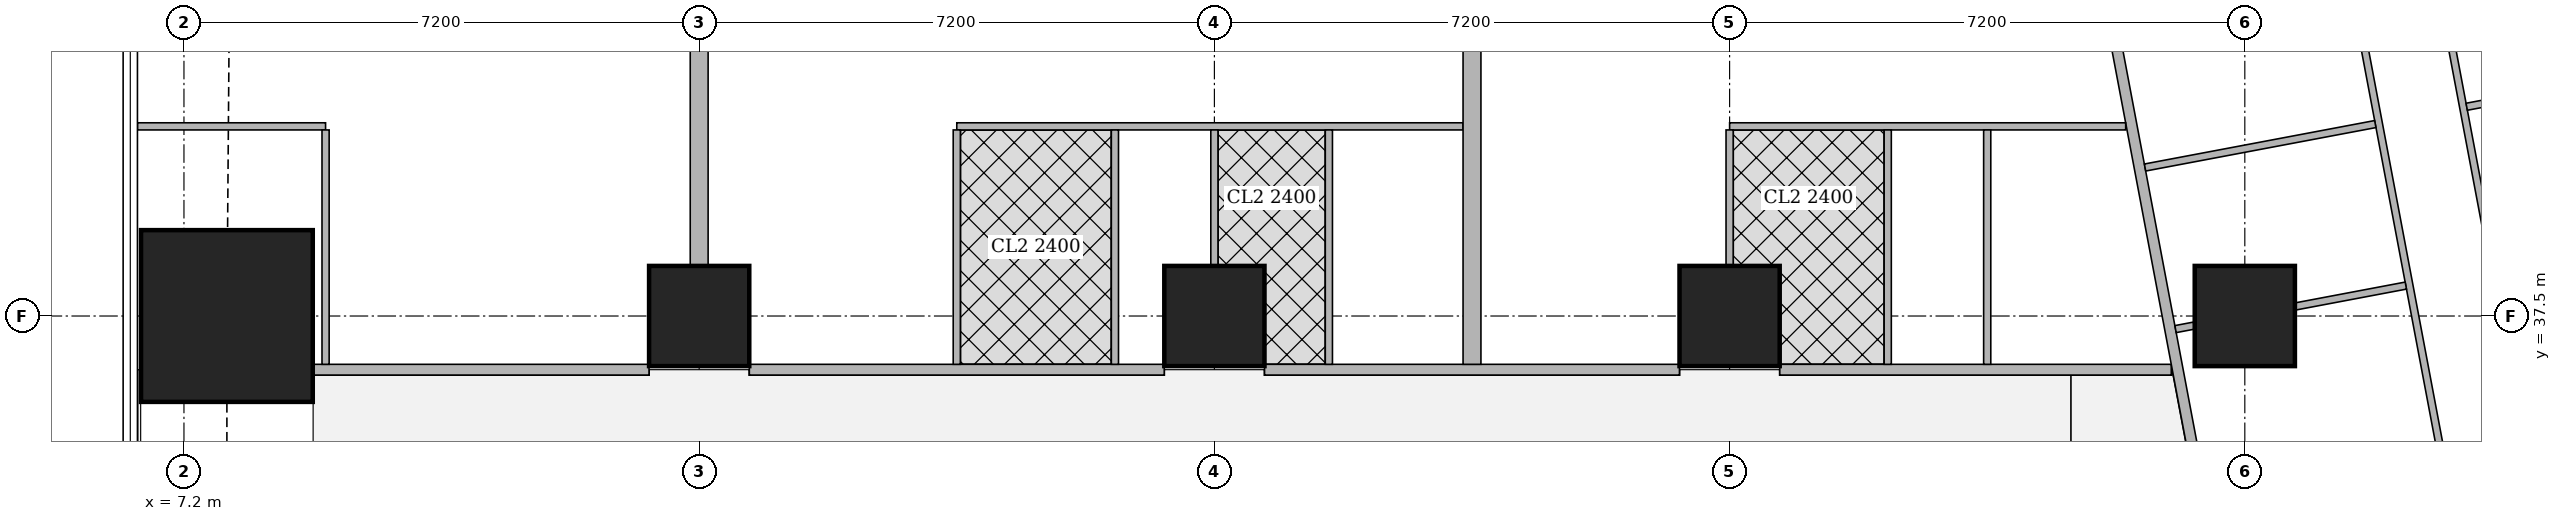
"""IFC4 building model, lengths in metres.
Left out: names, types, materials, properties, quantities, classifications, styles, units other than length and angle.
Written with IfcOpenShell. Run it as: python <this file> out.ifc"""

import sys

from ifc_helpers import new_model, si_unit, direction, frame, frame_2d, origin, origin_2d, place, context, subcontext, project, spatial, rectangle, extrude, element, fill, save


model = new_model("IFC4")
c1 = context("Model", 3, precision=1e-05, world=origin(), true_north=direction((0.0, 1.0)))
c2 = subcontext(c1, "Body", "Model", "MODEL_VIEW")
j1 = project(units=[si_unit("LENGTHUNIT", "METRE"), si_unit("PLANEANGLEUNIT", "RADIAN")], contexts=[c1])
p1 = place(None, origin())
s1 = spatial("IfcSite", under=j1, at=p1, CompositionType="ELEMENT")
p2 = place(p1, origin())
s2 = spatial("IfcBuilding", under=s1, at=p2, CompositionType="ELEMENT")
p3 = place(p2, frame((0.0, 0.0, 216.2)))
s3 = spatial("IfcBuildingStorey", under=s2, at=p3, CompositionType="ELEMENT", Elevation=216.2)
p4 = place(p3, frame((7.8, 37.5, 0.0), z_axis=(0.0, 0.0, 1.0), x_axis=(1.0, 0.0, 0.0)))
e1 = element("IfcColumn", 1, at=p4, inside=s3, PredefinedType="COLUMN", context=c2, shape_type="SweptSolid", body=[
    extrude(rectangle(XDim=2.4, YDim=2.4, at=origin_2d()), origin(), (0.0, 0.0, 1.0), 3.75),
])
for number, where, z_axis, x_axis in (
    (2, (14.4, 37.5, 0.0), (0.0, 0.0, 1.0), (1.0, 0.0, 0.0)),
    (3, (21.6, 37.5, 0.0), (0.0, 0.0, 1.0), (1.0, 0.0, 0.0)),
    (4, (28.8, 37.5, 0.0), (0.0, 0.0, 1.0), (1.0, 0.0, 0.0)),
    (5, (36.0, 37.5, 0.0), (0.0, 0.0, 1.0), (1.0, 0.0, 0.0)),
):
    element("IfcColumn", number, at=place(p3, frame(where, z_axis=z_axis, x_axis=x_axis)), inside=s3, PredefinedType="COLUMN", context=c2, shape_type="SweptSolid", body=[
        extrude(rectangle(XDim=1.4, YDim=1.4, at=origin_2d()), origin(), (0.0, 0.0, 1.0), 3.75),
    ])
p5 = place(p3, frame((9.001, 36.75, 0.0), z_axis=(0.0, 0.0, 1.0), x_axis=(1.0, 0.0, 0.0)))
e6 = element("IfcWall", 6, at=p5, inside=s3, PredefinedType="SOLIDWALL", context=c2, shape_type="SweptSolid", body=[
    extrude(rectangle(XDim=4.698, YDim=0.15, at=frame_2d((2.349, 0.0))), origin(), (0.0, 0.0, 1.0), 3.5),
])
p6 = place(p5, frame((0.353, 0.0, 0.0)))
e7 = element("IfcOpeningElement", 7, at=p6, cuts=e6, PredefinedType="OPENING", context=c2, shape_type="SweptSolid", body=[
    extrude(rectangle(XDim=1.0, YDim=2.1, at=frame_2d((0.5, 1.05))), frame((0.0, 0.085, 0.0), z_axis=(0.0, -1.0, 0.0), x_axis=(1.0, 0.0, 0.0)), (0.0, 0.0, 1.0), 0.17),
])
p7 = place(p3, frame((15.101, 36.75, 0.0), z_axis=(0.0, 0.0, 1.0), x_axis=(1.0, 0.0, 0.0)))
e8 = element("IfcWall", 8, at=p7, inside=s3, PredefinedType="SOLIDWALL", context=c2, shape_type="SweptSolid", body=[
    extrude(rectangle(XDim=5.798, YDim=0.15, at=frame_2d((2.899, 0.0))), origin(), (0.0, 0.0, 1.0), 3.5),
])
p8 = place(p7, frame((0.799, 0.0, 0.0)))
e9 = element("IfcOpeningElement", 9, at=p8, cuts=e8, PredefinedType="OPENING", context=c2, shape_type="SweptSolid", body=[
    extrude(rectangle(XDim=1.0, YDim=2.1, at=frame_2d((0.5, 1.05))), frame((0.0, 0.085, 0.0), z_axis=(0.0, -1.0, 0.0), x_axis=(1.0, 0.0, 0.0)), (0.0, 0.0, 1.0), 0.17),
])
p9 = place(p3, frame((22.301, 36.75, 0.0), z_axis=(0.0, 0.0, 1.0), x_axis=(1.0, 0.0, 0.0)))
e10 = element("IfcWall", 10, at=p9, inside=s3, PredefinedType="SOLIDWALL", context=c2, shape_type="SweptSolid", body=[
    extrude(rectangle(XDim=5.798, YDim=0.15, at=frame_2d((2.899, 0.0))), origin(), (0.0, 0.0, 1.0), 3.5),
])
p10 = place(p9, frame((4.082, 0.0, 0.0)))
e11 = element("IfcOpeningElement", 11, at=p10, cuts=e10, PredefinedType="OPENING", context=c2, shape_type="SweptSolid", body=[
    extrude(rectangle(XDim=1.0, YDim=2.1, at=frame_2d((0.5, 1.05))), frame((0.0, 0.085, 0.0), z_axis=(0.0, -1.0, 0.0), x_axis=(1.0, 0.0, 0.0)), (0.0, 0.0, 1.0), 0.17),
])
p11 = place(p3, frame((29.501, 36.75, 0.0), z_axis=(0.0, 0.0, 1.0), x_axis=(1.0, 0.0, 0.0)))
e12 = element("IfcWall", 12, at=p11, inside=s3, PredefinedType="SOLIDWALL", context=c2, shape_type="SweptSolid", body=[
    extrude(rectangle(XDim=5.471, YDim=0.15, at=frame_2d((2.735, 0.0))), origin(), (0.0, 0.0, 1.0), 3.5),
])
p12 = place(p3, frame((33.933, 42.73, 0.0), z_axis=(0.0, 0.0, 1.0), x_axis=(0.185595417643, -0.982626246825, 0.0)))
e13 = element("IfcWall", 13, at=p12, inside=s3, PredefinedType="SOLIDWALL", context=c2, shape_type="SweptSolid", body=[
    extrude(rectangle(XDim=41.051, YDim=0.15, at=frame_2d((20.525, 0.0))), origin(), (0.0, 0.0, 1.0), 2.5),
])
p13 = place(p12, frame((12.266, 0.0, 0.0)))
e14 = element("IfcOpeningElement", 14, at=p13, cuts=e13, PredefinedType="OPENING", context=c2, shape_type="SweptSolid", body=[
    extrude(rectangle(XDim=1.0, YDim=2.1, at=frame_2d((0.5, 1.05))), frame((0.0, 0.085, 0.0), z_axis=(0.0, -1.0, 0.0), x_axis=(1.0, 0.0, 0.0)), (0.0, 0.0, 1.0), 0.17),
])
p14 = place(p12, frame((16.082, 0.0, 0.0)))
e15 = element("IfcOpeningElement", 15, at=p14, cuts=e13, PredefinedType="OPENING", context=c2, shape_type="SweptSolid", body=[
    extrude(rectangle(XDim=1.0, YDim=2.1, at=frame_2d((0.5, 1.05))), frame((0.0, 0.085, 0.0), z_axis=(0.0, -1.0, 0.0), x_axis=(1.0, 0.0, 0.0)), (0.0, 0.0, 1.0), 0.17),
])
p15 = place(p12, frame((24.369, 0.0, 0.0)))
e16 = element("IfcOpeningElement", 16, at=p15, cuts=e13, PredefinedType="OPENING", context=c2, shape_type="SweptSolid", body=[
    extrude(rectangle(XDim=1.0, YDim=2.1, at=frame_2d((0.5, 1.05))), frame((0.0, 0.085, 0.0), z_axis=(0.0, -1.0, 0.0), x_axis=(1.0, 0.0, 0.0)), (0.0, 0.0, 1.0), 0.17),
])
p16 = place(p12, frame((30.862, 0.0, 0.0)))
e17 = element("IfcOpeningElement", 17, at=p16, cuts=e13, PredefinedType="OPENING", context=c2, shape_type="SweptSolid", body=[
    extrude(rectangle(XDim=1.0, YDim=2.1, at=frame_2d((0.5, 1.05))), frame((0.0, 0.085, 0.0), z_axis=(0.0, -1.0, 0.0), x_axis=(1.0, 0.0, 0.0)), (0.0, 0.0, 1.0), 0.17),
])
p17 = place(p3, frame((38.764, 41.941, 0.0), z_axis=(0.0, 0.0, 1.0), x_axis=(0.185548572312, -0.982635093671, 0.0)))
e18 = element("IfcWall", 18, at=p17, inside=s3, PredefinedType="PARTITIONING", context=c2, shape_type="SweptSolid", body=[
    extrude(rectangle(XDim=9.135, YDim=0.1, at=frame_2d((4.568, 0.0))), origin(), (0.0, 0.0, 1.0), 3.5),
])
p18 = place(p17, frame((8.085, 0.0, 0.0)))
e19 = element("IfcOpeningElement", 19, at=p18, cuts=e18, PredefinedType="OPENING", context=c2, shape_type="SweptSolid", body=[
    extrude(rectangle(XDim=0.9, YDim=2.1, at=frame_2d((0.45, 1.05))), frame((0.0, 0.06, 0.0), z_axis=(0.0, -1.0, 0.0), x_axis=(1.0, 0.0, 0.0)), (0.0, 0.0, 1.0), 0.12),
])
p19 = place(p17, frame((3.7, 0.0, 0.0)))
e20 = element("IfcOpeningElement", 20, at=p19, cuts=e18, PredefinedType="OPENING", context=c2, shape_type="SweptSolid", body=[
    extrude(rectangle(XDim=0.9, YDim=2.1, at=frame_2d((0.45, 1.05))), frame((0.0, 0.06, 0.0), z_axis=(0.0, -1.0, 0.0), x_axis=(1.0, 0.0, 0.0)), (0.0, 0.0, 1.0), 0.12),
])
p20 = place(p3, frame((37.473, 42.309, 0.0), z_axis=(0.0, 0.0, 1.0), x_axis=(0.185491912953, -0.982645790827, 0.0)))
e21 = element("IfcWall", 21, at=p20, inside=s3, PredefinedType="PARTITIONING", context=c2, shape_type="SweptSolid", body=[
    extrude(rectangle(XDim=9.737, YDim=0.1, at=frame_2d((4.869, 0.0))), origin(), (0.0, 0.0, 1.0), 3.5),
])
p21 = place(p20, frame((8.232, 0.0, 0.0)))
e22 = element("IfcOpeningElement", 22, at=p21, cuts=e21, PredefinedType="OPENING", context=c2, shape_type="SweptSolid", body=[
    extrude(rectangle(XDim=0.9, YDim=2.1, at=frame_2d((0.45, 1.05))), frame((0.0, 0.06, 0.0), z_axis=(0.0, -1.0, 0.0), x_axis=(1.0, 0.0, 0.0)), (0.0, 0.0, 1.0), 0.12),
])
p22 = place(p20, frame((2.853, 0.0, 0.0)))
e23 = element("IfcOpeningElement", 23, at=p22, cuts=e21, PredefinedType="OPENING", context=c2, shape_type="SweptSolid", body=[
    extrude(rectangle(XDim=0.9, YDim=2.1, at=frame_2d((0.45, 1.05))), frame((0.0, 0.06, 0.0), z_axis=(0.0, -1.0, 0.0), x_axis=(1.0, 0.0, 0.0)), (0.0, 0.0, 1.0), 0.12),
])
p23 = place(p20, frame((5.564, 0.0, 0.0)))
e24 = element("IfcOpeningElement", 24, at=p23, cuts=e21, PredefinedType="OPENING", context=c2, shape_type="SweptSolid", body=[
    extrude(rectangle(XDim=0.9, YDim=2.1, at=frame_2d((0.45, 1.05))), frame((0.0, 0.06, 0.0), z_axis=(0.0, -1.0, 0.0), x_axis=(1.0, 0.0, 0.0)), (0.0, 0.0, 1.0), 0.12),
])
p24 = place(p3, frame((43.277, 41.212, 0.0), z_axis=(0.0, 0.0, 1.0), x_axis=(-0.982665405803, -0.185387972203, 0.0)))
e25 = element("IfcWall", 25, at=p24, inside=s3, PredefinedType="PARTITIONING", context=c2, shape_type="SweptSolid", body=[
    extrude(rectangle(XDim=4.25, YDim=0.1, at=frame_2d((2.125, 0.0))), origin(), (0.0, 0.0, 1.0), 2.05),
])
p25 = place(p3, frame((37.823, 40.182, 0.0), z_axis=(0.0, 0.0, 1.0), x_axis=(-0.982664729897, -0.18539155487, 0.0)))
e26 = element("IfcWall", 26, at=p25, inside=s3, PredefinedType="PARTITIONING", context=c2, shape_type="SweptSolid", body=[
    extrude(rectangle(XDim=3.274, YDim=0.1, at=frame_2d((1.637, 0.0))), origin(), (0.0, 0.0, 1.0), 3.5),
])
p26 = place(p3, frame((38.25, 37.925, 0.0), z_axis=(0.0, 0.0, 1.0), x_axis=(-0.982610209589, -0.185680305934, 0.0)))
e27 = element("IfcWall", 27, at=p26, inside=s3, PredefinedType="PARTITIONING", context=c2, shape_type="SweptSolid", body=[
    extrude(rectangle(XDim=1.567, YDim=0.1, at=frame_2d((0.784, 0.0))), origin(), (0.0, 0.0, 1.0), 3.5),
])
p27 = place(p3, frame((35.29, 37.366, 0.0), z_axis=(0.0, 0.0, 1.0), x_axis=(-0.982395465615, -0.18681313963, 0.0)))
e28 = element("IfcWall", 28, at=p27, inside=s3, PredefinedType="PARTITIONING", context=c2, shape_type="SweptSolid", body=[
    extrude(rectangle(XDim=0.263, YDim=0.1, at=frame_2d((0.131, 0.0))), origin(), (0.0, 0.0, 1.0), 3.5),
])
p28 = place(p3, frame((6.55, 40.15, 0.0), z_axis=(0.0, 0.0, 1.0), x_axis=(1.0, 0.0, 0.0)))
e29 = element("IfcWall", 29, at=p28, inside=s3, PredefinedType="PARTITIONING", context=c2, shape_type="SweptSolid", body=[
    extrude(rectangle(XDim=2.629, YDim=0.1, at=frame_2d((1.314, 0.0))), origin(), (0.0, 0.0, 1.0), 2.05),
])
p29 = place(p3, frame((9.179, 36.825, 0.0), z_axis=(0.0, 0.0, 1.0), x_axis=(0.0, 1.0, 0.0)))
e30 = element("IfcWall", 30, at=p29, inside=s3, PredefinedType="PARTITIONING", context=c2, shape_type="SweptSolid", body=[
    extrude(rectangle(XDim=3.275, YDim=0.1, at=frame_2d((1.638, 0.0))), origin(), (0.0, 0.0, 1.0), 3.5),
])
p30 = place(p29, frame((2.225, 0.0, 0.0)))
e31 = element("IfcOpeningElement", 31, at=p30, cuts=e30, PredefinedType="OPENING", context=c2, shape_type="SweptSolid", body=[
    extrude(rectangle(XDim=0.9, YDim=2.1, at=frame_2d((0.45, 1.05))), frame((0.0, 0.06, 0.0), z_axis=(0.0, -1.0, 0.0), x_axis=(1.0, 0.0, 0.0)), (0.0, 0.0, 1.0), 0.12),
])
p31 = place(p3, frame((18.0, 40.15, 0.0), z_axis=(0.0, 0.0, 1.0), x_axis=(1.0, 0.0, 0.0)))
e32 = element("IfcWall", 32, at=p31, inside=s3, PredefinedType="PARTITIONING", context=c2, shape_type="SweptSolid", body=[
    extrude(rectangle(XDim=7.075, YDim=0.1, at=frame_2d((3.538, 0.0))), origin(), (0.0, 0.0, 1.0), 3.5),
])
p32 = place(p31, frame((0.655, 0.0, 0.0)))
e33 = element("IfcOpeningElement", 33, at=p32, cuts=e32, PredefinedType="OPENING", context=c2, shape_type="SweptSolid", body=[
    extrude(rectangle(XDim=0.9, YDim=2.1, at=frame_2d((0.45, 1.05))), frame((0.0, 0.06, 0.0), z_axis=(0.0, -1.0, 0.0), x_axis=(1.0, 0.0, 0.0)), (0.0, 0.0, 1.0), 0.12),
])
p33 = place(p31, frame((3.95, 0.0, 0.0)))
e34 = element("IfcOpeningElement", 34, at=p33, cuts=e32, PredefinedType="OPENING", context=c2, shape_type="SweptSolid", body=[
    extrude(rectangle(XDim=0.9, YDim=2.1, at=frame_2d((0.45, 1.05))), frame((0.0, 0.06, 0.0), z_axis=(0.0, -1.0, 0.0), x_axis=(1.0, 0.0, 0.0)), (0.0, 0.0, 1.0), 0.12),
])
p34 = place(p31, frame((2.455, 0.0, 0.0)))
e35 = element("IfcOpeningElement", 35, at=p34, cuts=e32, PredefinedType="OPENING", context=c2, shape_type="SweptSolid", body=[
    extrude(rectangle(XDim=0.9, YDim=2.1, at=frame_2d((0.45, 1.05))), frame((0.0, 0.06, 0.0), z_axis=(0.0, -1.0, 0.0), x_axis=(1.0, 0.0, 0.0)), (0.0, 0.0, 1.0), 0.12),
])
p35 = place(p31, frame((5.75, 0.0, 0.0)))
e36 = element("IfcOpeningElement", 36, at=p35, cuts=e32, PredefinedType="OPENING", context=c2, shape_type="SweptSolid", body=[
    extrude(rectangle(XDim=0.9, YDim=2.1, at=frame_2d((0.45, 1.05))), frame((0.0, 0.06, 0.0), z_axis=(0.0, -1.0, 0.0), x_axis=(1.0, 0.0, 0.0)), (0.0, 0.0, 1.0), 0.12),
])
p36 = place(p3, frame((18.0, 36.825, 0.0), z_axis=(0.0, 0.0, 1.0), x_axis=(0.0, 1.0, 0.0)))
e37 = element("IfcWall", 37, at=p36, inside=s3, PredefinedType="PARTITIONING", context=c2, shape_type="SweptSolid", body=[
    extrude(rectangle(XDim=3.275, YDim=0.1, at=frame_2d((1.638, 0.0))), origin(), (0.0, 0.0, 1.0), 3.5),
])
p37 = place(p3, frame((21.6, 38.201, 0.0), z_axis=(0.0, 0.0, 1.0), x_axis=(0.0, 1.0, 0.0)))
e38 = element("IfcWall", 38, at=p37, inside=s3, PredefinedType="PARTITIONING", context=c2, shape_type="SweptSolid", body=[
    extrude(rectangle(XDim=1.899, YDim=0.1, at=frame_2d((0.95, 0.0))), origin(), (0.0, 0.0, 1.0), 3.5),
])
for number, where, z_axis, x_axis in (
    (39, (20.21, 36.825, 0.0), (0.0, 0.0, 1.0), (0.0, 1.0, 0.0)),
    (40, (23.2, 36.825, 0.0), (0.0, 0.0, 1.0), (0.0, 1.0, 0.0)),
):
    element("IfcWall", number, at=place(p3, frame(where, z_axis=z_axis, x_axis=x_axis)), inside=s3, PredefinedType="PARTITIONING", context=c2, shape_type="SweptSolid", body=[
        extrude(rectangle(XDim=3.275, YDim=0.1, at=frame_2d((1.638, 0.0))), origin(), (0.0, 0.0, 1.0), 3.5),
    ])
p38 = place(p3, frame((14.4, 38.201, 0.0), z_axis=(0.0, 0.0, 1.0), x_axis=(0.0, 1.0, 0.0)))
e41 = element("IfcWall", 41, at=p38, inside=s3, PredefinedType="SOLIDWALL", context=c2, shape_type="SweptSolid", body=[
    extrude(rectangle(XDim=3.149, YDim=0.25, at=frame_2d((1.575, 0.0))), origin(), (0.0, 0.0, 1.0), 3.5),
])
p39 = place(p3, frame((28.8, 40.15, 0.0), z_axis=(0.0, 0.0, 1.0), x_axis=(1.0, 0.0, 0.0)))
e42 = element("IfcWall", 42, at=p39, inside=s3, PredefinedType="PARTITIONING", context=c2, shape_type="SweptSolid", body=[
    extrude(rectangle(XDim=5.535, YDim=0.1, at=frame_2d((2.768, 0.0))), origin(), (0.0, 0.0, 1.0), 3.5),
])
p40 = place(p39, frame((0.655, 0.0, 0.0)))
e43 = element("IfcOpeningElement", 43, at=p40, cuts=e42, PredefinedType="OPENING", context=c2, shape_type="SweptSolid", body=[
    extrude(rectangle(XDim=0.9, YDim=2.1, at=frame_2d((0.45, 1.05))), frame((0.0, 0.06, 0.0), z_axis=(0.0, -1.0, 0.0), x_axis=(1.0, 0.0, 0.0)), (0.0, 0.0, 1.0), 0.12),
])
p41 = place(p39, frame((4.481, 0.0, 0.0)))
e44 = element("IfcOpeningElement", 44, at=p41, cuts=e42, PredefinedType="OPENING", context=c2, shape_type="SweptSolid", body=[
    extrude(rectangle(XDim=0.9, YDim=2.1, at=frame_2d((0.45, 1.05))), frame((0.0, 0.06, 0.0), z_axis=(0.0, -1.0, 0.0), x_axis=(1.0, 0.0, 0.0)), (0.0, 0.0, 1.0), 0.12),
])
p42 = place(p39, frame((2.455, 0.0, 0.0)))
e45 = element("IfcOpeningElement", 45, at=p42, cuts=e42, PredefinedType="OPENING", context=c2, shape_type="SweptSolid", body=[
    extrude(rectangle(XDim=0.9, YDim=2.1, at=frame_2d((0.45, 1.05))), frame((0.0, 0.06, 0.0), z_axis=(0.0, -1.0, 0.0), x_axis=(1.0, 0.0, 0.0)), (0.0, 0.0, 1.0), 0.12),
])
p43 = place(p3, frame((28.8, 38.201, 0.0), z_axis=(0.0, 0.0, 1.0), x_axis=(0.0, 1.0, 0.0)))
e46 = element("IfcWall", 46, at=p43, inside=s3, PredefinedType="PARTITIONING", context=c2, shape_type="SweptSolid", body=[
    extrude(rectangle(XDim=1.899, YDim=0.1, at=frame_2d((0.95, 0.0))), origin(), (0.0, 0.0, 1.0), 3.5),
])
for number, where, z_axis, x_axis in (
    (47, (32.4, 36.825, 0.0), (0.0, 0.0, 1.0), (0.0, 1.0, 0.0)),
    (48, (31.01, 36.825, 0.0), (0.0, 0.0, 1.0), (0.0, 1.0, 0.0)),
):
    element("IfcWall", number, at=place(p3, frame(where, z_axis=z_axis, x_axis=x_axis)), inside=s3, PredefinedType="PARTITIONING", context=c2, shape_type="SweptSolid", body=[
        extrude(rectangle(XDim=3.275, YDim=0.1, at=frame_2d((1.638, 0.0))), origin(), (0.0, 0.0, 1.0), 3.5),
    ])
p44 = place(p3, frame((25.2, 36.825, 0.0), z_axis=(0.0, 0.0, 1.0), x_axis=(0.0, 1.0, 0.0)))
e49 = element("IfcWall", 49, at=p44, inside=s3, PredefinedType="SOLIDWALL", context=c2, shape_type="SweptSolid", body=[
    extrude(rectangle(XDim=4.525, YDim=0.25, at=frame_2d((2.263, 0.0))), origin(), (0.0, 0.0, 1.0), 3.5),
])
p45 = place(p22, origin())
e50 = element("IfcDoor", 50, at=p45, inside=s3, OperationType="SINGLE_SWING_LEFT", PredefinedType="DOOR", context=c2, shape_type="SweptSolid", body=[
    extrude(rectangle(XDim=0.9, YDim=2.1, at=frame_2d((0.45, 1.05))), frame((0.0, 0.025, 0.0), z_axis=(0.0, -1.0, 0.0), x_axis=(1.0, 0.0, 0.0)), (0.0, 0.0, 1.0), 0.05),
])
fill(e23, e50)
p46 = place(p23, origin())
e51 = element("IfcDoor", 51, at=p46, inside=s3, OperationType="SINGLE_SWING_LEFT", PredefinedType="DOOR", context=c2, shape_type="SweptSolid", body=[
    extrude(rectangle(XDim=0.9, YDim=2.1, at=frame_2d((0.45, 1.05))), frame((0.0, 0.025, 0.0), z_axis=(0.0, -1.0, 0.0), x_axis=(1.0, 0.0, 0.0)), (0.0, 0.0, 1.0), 0.05),
])
fill(e24, e51)
p47 = place(p30, origin())
e52 = element("IfcDoor", 52, at=p47, inside=s3, OperationType="SINGLE_SWING_RIGHT", PredefinedType="DOOR", context=c2, shape_type="SweptSolid", body=[
    extrude(rectangle(XDim=0.9, YDim=2.1, at=frame_2d((0.45, 1.05))), frame((0.0, 0.025, 0.0), z_axis=(0.0, -1.0, 0.0), x_axis=(1.0, 0.0, 0.0)), (0.0, 0.0, 1.0), 0.05),
])
fill(e31, e52)
p48 = place(p6, origin())
e53 = element("IfcDoor", 53, at=p48, inside=s3, OperationType="SINGLE_SWING_LEFT", PredefinedType="DOOR", context=c2, shape_type="SweptSolid", body=[
    extrude(rectangle(XDim=1.0, YDim=2.1, at=frame_2d((0.5, 1.05))), frame((0.0, 0.025, 0.0), z_axis=(0.0, -1.0, 0.0), x_axis=(1.0, 0.0, 0.0)), (0.0, 0.0, 1.0), 0.05),
])
fill(e7, e53)
p49 = place(p32, origin())
e54 = element("IfcDoor", 54, at=p49, inside=s3, OperationType="SINGLE_SWING_RIGHT", PredefinedType="DOOR", context=c2, shape_type="SweptSolid", body=[
    extrude(rectangle(XDim=0.9, YDim=2.1, at=frame_2d((0.45, 1.05))), frame((0.0, 0.025, 0.0), z_axis=(0.0, -1.0, 0.0), x_axis=(1.0, 0.0, 0.0)), (0.0, 0.0, 1.0), 0.05),
])
fill(e33, e54)
p50 = place(p33, origin())
e55 = element("IfcDoor", 55, at=p50, inside=s3, OperationType="SINGLE_SWING_LEFT", PredefinedType="DOOR", context=c2, shape_type="SweptSolid", body=[
    extrude(rectangle(XDim=0.9, YDim=2.1, at=frame_2d((0.45, 1.05))), frame((0.0, 0.025, 0.0), z_axis=(0.0, -1.0, 0.0), x_axis=(1.0, 0.0, 0.0)), (0.0, 0.0, 1.0), 0.05),
])
fill(e34, e55)
p51 = place(p34, origin())
e56 = element("IfcDoor", 56, at=p51, inside=s3, OperationType="SINGLE_SWING_LEFT", PredefinedType="DOOR", context=c2, shape_type="SweptSolid", body=[
    extrude(rectangle(XDim=0.9, YDim=2.1, at=frame_2d((0.45, 1.05))), frame((0.0, 0.025, 0.0), z_axis=(0.0, -1.0, 0.0), x_axis=(1.0, 0.0, 0.0)), (0.0, 0.0, 1.0), 0.05),
])
fill(e35, e56)
p52 = place(p35, origin())
e57 = element("IfcDoor", 57, at=p52, inside=s3, OperationType="SINGLE_SWING_LEFT", PredefinedType="DOOR", context=c2, shape_type="SweptSolid", body=[
    extrude(rectangle(XDim=0.9, YDim=2.1, at=frame_2d((0.45, 1.05))), frame((0.0, 0.025, 0.0), z_axis=(0.0, -1.0, 0.0), x_axis=(1.0, 0.0, 0.0)), (0.0, 0.0, 1.0), 0.05),
])
fill(e36, e57)
p53 = place(p8, origin())
e58 = element("IfcDoor", 58, at=p53, inside=s3, OperationType="SINGLE_SWING_LEFT", PredefinedType="DOOR", context=c2, shape_type="SweptSolid", body=[
    extrude(rectangle(XDim=1.0, YDim=2.1, at=frame_2d((0.5, 1.05))), frame((0.0, 0.025, 0.0), z_axis=(0.0, -1.0, 0.0), x_axis=(1.0, 0.0, 0.0)), (0.0, 0.0, 1.0), 0.05),
])
fill(e9, e58)
p54 = place(p40, origin())
e59 = element("IfcDoor", 59, at=p54, inside=s3, OperationType="SINGLE_SWING_RIGHT", PredefinedType="DOOR", context=c2, shape_type="SweptSolid", body=[
    extrude(rectangle(XDim=0.9, YDim=2.1, at=frame_2d((0.45, 1.05))), frame((0.0, 0.025, 0.0), z_axis=(0.0, -1.0, 0.0), x_axis=(1.0, 0.0, 0.0)), (0.0, 0.0, 1.0), 0.05),
])
fill(e43, e59)
p55 = place(p41, origin())
e60 = element("IfcDoor", 60, at=p55, inside=s3, OperationType="SINGLE_SWING_LEFT", PredefinedType="DOOR", context=c2, shape_type="SweptSolid", body=[
    extrude(rectangle(XDim=0.9, YDim=2.1, at=frame_2d((0.45, 1.05))), frame((0.0, 0.025, 0.0), z_axis=(0.0, -1.0, 0.0), x_axis=(1.0, 0.0, 0.0)), (0.0, 0.0, 1.0), 0.05),
])
fill(e44, e60)
p56 = place(p42, origin())
e61 = element("IfcDoor", 61, at=p56, inside=s3, OperationType="SINGLE_SWING_RIGHT", PredefinedType="DOOR", context=c2, shape_type="SweptSolid", body=[
    extrude(rectangle(XDim=0.9, YDim=2.1, at=frame_2d((0.45, 1.05))), frame((0.0, 0.025, 0.0), z_axis=(0.0, -1.0, 0.0), x_axis=(1.0, 0.0, 0.0)), (0.0, 0.0, 1.0), 0.05),
])
fill(e45, e61)
p57 = place(p10, origin())
e62 = element("IfcDoor", 62, at=p57, inside=s3, OperationType="SINGLE_SWING_RIGHT", PredefinedType="DOOR", context=c2, shape_type="SweptSolid", body=[
    extrude(rectangle(XDim=1.0, YDim=2.1, at=frame_2d((0.5, 1.05))), frame((0.0, 0.025, 0.0), z_axis=(0.0, -1.0, 0.0), x_axis=(1.0, 0.0, 0.0)), (0.0, 0.0, 1.0), 0.05),
])
fill(e11, e62)
save(model, sys.argv[1])
